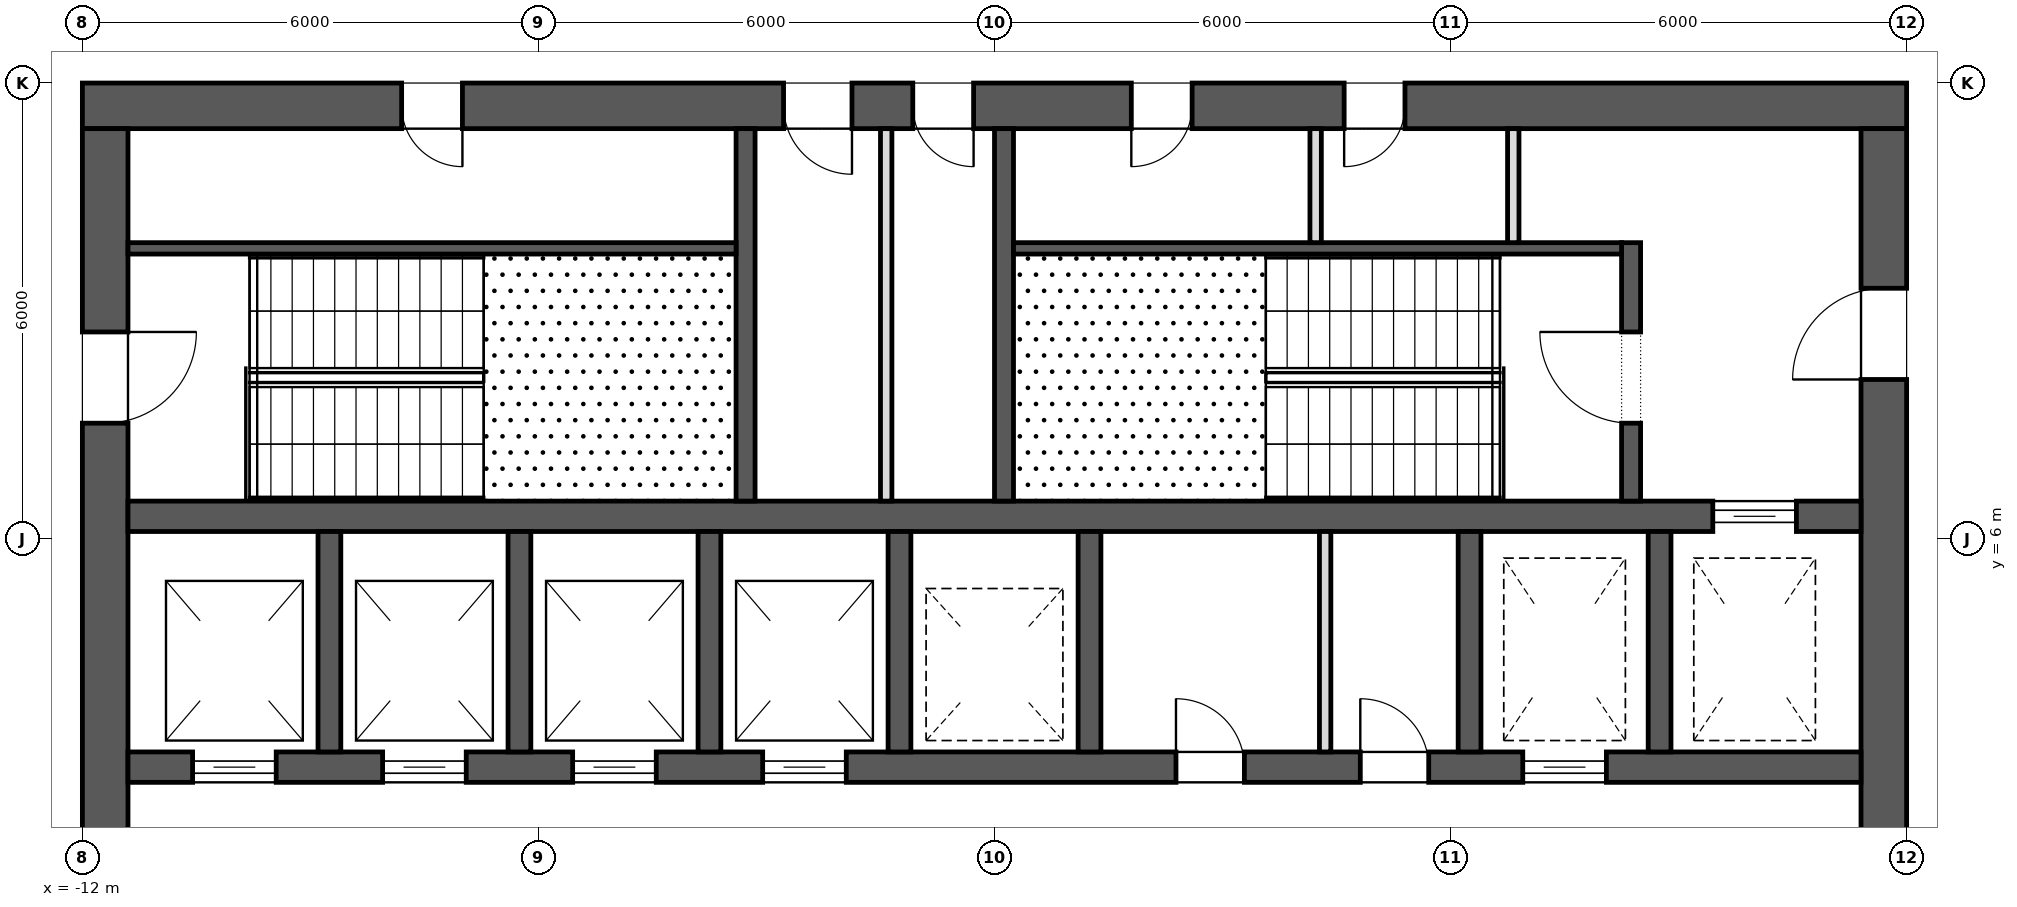
"""IFC4 building model, lengths in metres.
Left out: names, types, materials, properties, quantities, classifications, styles, units other than length and angle.
Written with IfcOpenShell. Run it as: python <this file> out.ifc"""

import sys

from ifc_helpers import new_model, si_unit, direction, frame, frame_2d, origin, place, context, subcontext, project, spatial, rectangle, extrude, element, fill, save


model = new_model("IFC4")
c1 = context("Model", 3, precision=1e-05, world=origin(), true_north=direction((0.0, 1.0)))
c2 = subcontext(c1, "Body", "Model", "MODEL_VIEW")
j1 = project(units=[si_unit("LENGTHUNIT", "METRE"), si_unit("PLANEANGLEUNIT", "RADIAN")], contexts=[c1])
p1 = place(None, origin())
s1 = spatial("IfcSite", under=j1, at=p1, CompositionType="ELEMENT")
p2 = place(p1, origin())
s2 = spatial("IfcBuilding", under=s1, at=p2, CompositionType="ELEMENT")
p3 = place(p2, frame((0.0, 0.0, 178.9)))
s3 = spatial("IfcBuildingStorey", under=s2, at=p3, CompositionType="ELEMENT", Elevation=178.9)
p4 = place(p3, frame((-12.0, 11.7, 0.0), z_axis=(0.0, 0.0, 1.0), x_axis=(1.0, 0.0, 0.0)))
e1 = element("IfcWall", 1, at=p4, inside=s3, PredefinedType="SHEAR", context=c2, shape_type="SweptSolid", body=[
    extrude(rectangle(XDim=24.0, YDim=0.6, at=frame_2d((12.0, 0.0))), origin(), (0.0, 0.0, 1.0), 4.0),
])
p5 = place(p4, frame((9.225, 0.0, 0.0)))
e2 = element("IfcOpeningElement", 2, at=p5, cuts=e1, PredefinedType="OPENING", context=c2, shape_type="SweptSolid", body=[
    extrude(rectangle(XDim=0.9, YDim=2.1, at=frame_2d((0.45, 1.05))), frame((0.0, 0.312, 0.0), z_axis=(0.0, -1.0, 0.0), x_axis=(1.0, 0.0, 0.0)), (0.0, 0.0, 1.0), 0.624),
])
p6 = place(p4, frame((10.925, 0.0, 0.0)))
e3 = element("IfcOpeningElement", 3, at=p6, cuts=e1, PredefinedType="OPENING", context=c2, shape_type="SweptSolid", body=[
    extrude(rectangle(XDim=0.8, YDim=2.1, at=frame_2d((0.4, 1.05))), frame((0.0, 0.312, 0.0), z_axis=(0.0, -1.0, 0.0), x_axis=(1.0, 0.0, 0.0)), (0.0, 0.0, 1.0), 0.624),
])
p7 = place(p4, frame((4.2, 0.0, 0.0)))
e4 = element("IfcOpeningElement", 4, at=p7, cuts=e1, PredefinedType="OPENING", context=c2, shape_type="SweptSolid", body=[
    extrude(rectangle(XDim=0.8, YDim=2.1, at=frame_2d((0.4, 1.05))), frame((0.0, 0.312, 0.0), z_axis=(0.0, -1.0, 0.0), x_axis=(1.0, 0.0, 0.0)), (0.0, 0.0, 1.0), 0.624),
])
p8 = place(p4, frame((13.8, 0.0, 0.0)))
e5 = element("IfcOpeningElement", 5, at=p8, cuts=e1, PredefinedType="OPENING", context=c2, shape_type="SweptSolid", body=[
    extrude(rectangle(XDim=0.8, YDim=2.1, at=frame_2d((0.4, 1.05))), frame((0.0, 0.312, 0.0), z_axis=(0.0, -1.0, 0.0), x_axis=(1.0, 0.0, 0.0)), (0.0, 0.0, 1.0), 0.624),
])
p9 = place(p4, frame((16.6, 0.0, 0.0)))
e6 = element("IfcOpeningElement", 6, at=p9, cuts=e1, PredefinedType="OPENING", context=c2, shape_type="SweptSolid", body=[
    extrude(rectangle(XDim=0.8, YDim=2.1, at=frame_2d((0.4, 1.05))), frame((0.0, 0.312, 0.0), z_axis=(0.0, -1.0, 0.0), x_axis=(1.0, 0.0, 0.0)), (0.0, 0.0, 1.0), 0.624),
])
p10 = place(p3, frame((11.7, -11.4, 0.0), z_axis=(0.0, 0.0, 1.0), x_axis=(0.0, 1.0, 0.0)))
e7 = element("IfcWall", 7, at=p10, inside=s3, PredefinedType="SHEAR", context=c2, shape_type="SweptSolid", body=[
    extrude(rectangle(XDim=22.8, YDim=0.6, at=frame_2d((11.4, 0.0))), origin(), (0.0, 0.0, 1.0), 4.0),
])
p11 = place(p10, frame((10.2, 0.0, 0.0)))
e8 = element("IfcOpeningElement", 8, at=p11, cuts=e7, PredefinedType="OPENING", context=c2, shape_type="SweptSolid", body=[
    extrude(rectangle(XDim=2.4, YDim=2.1, at=frame_2d((1.2, 1.05))), frame((0.0, 0.312, 0.0), z_axis=(0.0, -1.0, 0.0), x_axis=(1.0, 0.0, 0.0)), (0.0, 0.0, 1.0), 0.624),
])
p12 = place(p10, frame((19.5, 0.0, 0.0)))
e9 = element("IfcOpeningElement", 9, at=p12, cuts=e7, PredefinedType="OPENING", context=c2, shape_type="SweptSolid", body=[
    extrude(rectangle(XDim=1.2, YDim=2.1, at=frame_2d((0.6, 1.05))), frame((0.0, 0.312, 0.0), z_axis=(0.0, -1.0, 0.0), x_axis=(1.0, 0.0, 0.0)), (0.0, 0.0, 1.0), 0.624),
])
p13 = place(p10, frame((2.1, 0.0, 0.0)))
e10 = element("IfcOpeningElement", 10, at=p13, cuts=e7, PredefinedType="OPENING", context=c2, shape_type="SweptSolid", body=[
    extrude(rectangle(XDim=1.2, YDim=2.1, at=frame_2d((0.6, 1.05))), frame((0.0, 0.312, 0.0), z_axis=(0.0, -1.0, 0.0), x_axis=(1.0, 0.0, 0.0)), (0.0, 0.0, 1.0), 0.624),
])
p14 = place(p3, frame((-11.7, -11.4, 0.0), z_axis=(0.0, 0.0, 1.0), x_axis=(0.0, 1.0, 0.0)))
e11 = element("IfcWall", 11, at=p14, inside=s3, PredefinedType="SHEAR", context=c2, shape_type="SweptSolid", body=[
    extrude(rectangle(XDim=22.8, YDim=0.6, at=frame_2d((11.4, 0.0))), origin(), (0.0, 0.0, 1.0), 4.0),
])
p15 = place(p14, frame((10.2, 0.0, 0.0)))
e12 = element("IfcOpeningElement", 12, at=p15, cuts=e11, PredefinedType="OPENING", context=c2, shape_type="SweptSolid", body=[
    extrude(rectangle(XDim=2.4, YDim=2.1, at=frame_2d((1.2, 1.05))), frame((0.0, 0.312, 0.0), z_axis=(0.0, -1.0, 0.0), x_axis=(1.0, 0.0, 0.0)), (0.0, 0.0, 1.0), 0.624),
])
p16 = place(p14, frame((18.925, 0.0, 0.0)))
e13 = element("IfcOpeningElement", 13, at=p16, cuts=e11, PredefinedType="OPENING", context=c2, shape_type="SweptSolid", body=[
    extrude(rectangle(XDim=1.2, YDim=2.1, at=frame_2d((0.6, 1.05))), frame((0.0, 0.312, 0.0), z_axis=(0.0, -1.0, 0.0), x_axis=(1.0, 0.0, 0.0)), (0.0, 0.0, 1.0), 0.624),
])
p17 = place(p14, frame((2.675, 0.0, 0.0)))
e14 = element("IfcOpeningElement", 14, at=p17, cuts=e11, PredefinedType="OPENING", context=c2, shape_type="SweptSolid", body=[
    extrude(rectangle(XDim=1.2, YDim=2.1, at=frame_2d((0.6, 1.05))), frame((0.0, 0.312, 0.0), z_axis=(0.0, -1.0, 0.0), x_axis=(1.0, 0.0, 0.0)), (0.0, 0.0, 1.0), 0.624),
])
p18 = place(p3, frame((-11.4, 3.0, 0.0), z_axis=(0.0, 0.0, 1.0), x_axis=(1.0, 0.0, 0.0)))
e15 = element("IfcWall", 15, at=p18, inside=s3, PredefinedType="SHEAR", context=c2, shape_type="SweptSolid", body=[
    extrude(rectangle(XDim=22.8, YDim=0.4, at=frame_2d((11.4, 0.0))), origin(), (0.0, 0.0, 1.0), 4.0),
])
p19 = place(p18, frame((0.85, 0.0, 0.0)))
e16 = element("IfcOpeningElement", 16, at=p19, cuts=e15, PredefinedType="OPENING", context=c2, shape_type="SweptSolid", body=[
    extrude(rectangle(XDim=1.1, YDim=2.1, at=frame_2d((0.55, 1.05))), frame((0.0, 0.212, 0.0), z_axis=(0.0, -1.0, 0.0), x_axis=(1.0, 0.0, 0.0)), (0.0, 0.0, 1.0), 0.424),
])
p20 = place(p18, frame((3.35, 0.0, 0.0)))
e17 = element("IfcOpeningElement", 17, at=p20, cuts=e15, PredefinedType="OPENING", context=c2, shape_type="SweptSolid", body=[
    extrude(rectangle(XDim=1.1, YDim=2.1, at=frame_2d((0.55, 1.05))), frame((0.0, 0.212, 0.0), z_axis=(0.0, -1.0, 0.0), x_axis=(1.0, 0.0, 0.0)), (0.0, 0.0, 1.0), 0.424),
])
p21 = place(p18, frame((5.85, 0.0, 0.0)))
e18 = element("IfcOpeningElement", 18, at=p21, cuts=e15, PredefinedType="OPENING", context=c2, shape_type="SweptSolid", body=[
    extrude(rectangle(XDim=1.1, YDim=2.1, at=frame_2d((0.55, 1.05))), frame((0.0, 0.212, 0.0), z_axis=(0.0, -1.0, 0.0), x_axis=(1.0, 0.0, 0.0)), (0.0, 0.0, 1.0), 0.424),
])
p22 = place(p18, frame((8.35, 0.0, 0.0)))
e19 = element("IfcOpeningElement", 19, at=p22, cuts=e15, PredefinedType="OPENING", context=c2, shape_type="SweptSolid", body=[
    extrude(rectangle(XDim=1.1, YDim=2.1, at=frame_2d((0.55, 1.05))), frame((0.0, 0.212, 0.0), z_axis=(0.0, -1.0, 0.0), x_axis=(1.0, 0.0, 0.0)), (0.0, 0.0, 1.0), 0.424),
])
p23 = place(p18, frame((18.35, 0.0, 0.0)))
e20 = element("IfcOpeningElement", 20, at=p23, cuts=e15, PredefinedType="OPENING", context=c2, shape_type="SweptSolid", body=[
    extrude(rectangle(XDim=1.1, YDim=2.1, at=frame_2d((0.55, 1.05))), frame((0.0, 0.212, 0.0), z_axis=(0.0, -1.0, 0.0), x_axis=(1.0, 0.0, 0.0)), (0.0, 0.0, 1.0), 0.424),
])
p24 = place(p18, frame((13.788, 0.0, 0.0)))
e21 = element("IfcOpeningElement", 21, at=p24, cuts=e15, PredefinedType="OPENING", context=c2, shape_type="SweptSolid", body=[
    extrude(rectangle(XDim=0.9, YDim=2.1, at=frame_2d((0.45, 1.05))), frame((0.0, 0.212, 0.0), z_axis=(0.0, -1.0, 0.0), x_axis=(1.0, 0.0, 0.0)), (0.0, 0.0, 1.0), 0.424),
])
p25 = place(p18, frame((16.212, 0.0, 0.0)))
e22 = element("IfcOpeningElement", 22, at=p25, cuts=e15, PredefinedType="OPENING", context=c2, shape_type="SweptSolid", body=[
    extrude(rectangle(XDim=0.9, YDim=2.1, at=frame_2d((0.45, 1.05))), frame((0.0, 0.212, 0.0), z_axis=(0.0, -1.0, 0.0), x_axis=(1.0, 0.0, 0.0)), (0.0, 0.0, 1.0), 0.424),
])
p26 = place(p3, frame((-11.4, 6.3, 0.0), z_axis=(0.0, 0.0, 1.0), x_axis=(1.0, 0.0, 0.0)))
e23 = element("IfcWall", 23, at=p26, inside=s3, PredefinedType="SHEAR", context=c2, shape_type="SweptSolid", body=[
    extrude(rectangle(XDim=22.8, YDim=0.4, at=frame_2d((11.4, 0.0))), origin(), (0.0, 0.0, 1.0), 4.0),
])
p27 = place(p26, frame((20.85, 0.0, 0.0)))
e24 = element("IfcOpeningElement", 24, at=p27, cuts=e23, PredefinedType="OPENING", context=c2, shape_type="SweptSolid", body=[
    extrude(rectangle(XDim=1.1, YDim=2.1, at=frame_2d((0.55, 1.05))), frame((0.0, 0.212, 0.0), z_axis=(0.0, -1.0, 0.0), x_axis=(1.0, 0.0, 0.0)), (0.0, 0.0, 1.0), 0.424),
])
for number, where, z_axis, x_axis in (
    (25, (-8.75, 3.2, 0.0), (0.0, 0.0, 1.0), (0.0, 1.0, 0.0)),
    (26, (-6.25, 3.2, 0.0), (0.0, 0.0, 1.0), (0.0, 1.0, 0.0)),
    (27, (-3.75, 3.2, 0.0), (0.0, 0.0, 1.0), (0.0, 1.0, 0.0)),
    (28, (-1.25, 3.2, 0.0), (0.0, 0.0, 1.0), (0.0, 1.0, 0.0)),
    (29, (1.25, 3.2, 0.0), (0.0, 0.0, 1.0), (0.0, 1.0, 0.0)),
    (30, (6.25, 3.2, 0.0), (0.0, 0.0, 1.0), (0.0, 1.0, 0.0)),
    (31, (8.75, 3.2, 0.0), (0.0, 0.0, 1.0), (0.0, 1.0, 0.0)),
):
    element("IfcWall", number, at=place(p3, frame(where, z_axis=z_axis, x_axis=x_axis)), inside=s3, PredefinedType="SHEAR", context=c2, shape_type="SweptSolid", body=[
        extrude(rectangle(XDim=2.9, YDim=0.3, at=frame_2d((1.45, 0.0))), origin(), (0.0, 0.0, 1.0), 4.0),
    ])
for number, where, z_axis, x_axis in (
    (32, (-3.275, 6.5, 0.0), (0.0, 0.0, 1.0), (0.0, 1.0, 0.0)),
    (33, (0.125, 6.5, 0.0), (0.0, 0.0, 1.0), (0.0, 1.0, 0.0)),
):
    element("IfcWall", number, at=place(p3, frame(where, z_axis=z_axis, x_axis=x_axis)), inside=s3, PredefinedType="SHEAR", context=c2, shape_type="SweptSolid", body=[
        extrude(rectangle(XDim=4.9, YDim=0.25, at=frame_2d((2.45, 0.0))), origin(), (0.0, 0.0, 1.0), 3.7),
    ])
p28 = place(p3, frame((8.375, 6.5, 0.0), z_axis=(0.0, 0.0, 1.0), x_axis=(0.0, 1.0, 0.0)))
e34 = element("IfcWall", 34, at=p28, inside=s3, PredefinedType="SHEAR", context=c2, shape_type="SweptSolid", body=[
    extrude(rectangle(XDim=3.4, YDim=0.25, at=frame_2d((1.7, 0.0))), origin(), (0.0, 0.0, 1.0), 3.7),
])
p29 = place(p28, frame((1.025, 0.0, 0.0)))
e35 = element("IfcOpeningElement", 35, at=p29, cuts=e34, PredefinedType="OPENING", context=c2, shape_type="SweptSolid", body=[
    extrude(rectangle(XDim=1.2, YDim=2.1, at=frame_2d((0.6, 1.05))), frame((0.0, 0.137, 0.0), z_axis=(0.0, -1.0, 0.0), x_axis=(1.0, 0.0, 0.0)), (0.0, 0.0, 1.0), 0.274),
])
for number, where, z_axis, x_axis in (
    (36, (-11.4, 9.825, 0.0), (0.0, 0.0, 1.0), (1.0, 0.0, 0.0)),
    (37, (0.25, 9.825, 0.0), (0.0, 0.0, 1.0), (1.0, 0.0, 0.0)),
):
    element("IfcWall", number, at=place(p3, frame(where, z_axis=z_axis, x_axis=x_axis)), inside=s3, PredefinedType="SHEAR", context=c2, shape_type="SweptSolid", body=[
        extrude(rectangle(XDim=8.0, YDim=0.15, at=frame_2d((4.0, 0.0))), origin(), (0.0, 0.0, 1.0), 3.7),
    ])
p30 = place(p3, frame((-1.425, 6.5, 0.0), z_axis=(0.0, 0.0, 1.0), x_axis=(0.0, 1.0, 0.0)))
e38 = element("IfcWall", 38, at=p30, inside=s3, PredefinedType="PARTITIONING", context=c2, shape_type="SweptSolid", body=[
    extrude(rectangle(XDim=4.9, YDim=0.15, at=frame_2d((2.45, 0.0))), origin(), (0.0, 0.0, 1.0), 3.7),
])
for number, where, z_axis, x_axis in (
    (39, (4.225, 9.9, 0.0), (0.0, 0.0, 1.0), (0.0, 1.0, 0.0)),
    (40, (6.825, 9.9, 0.0), (0.0, 0.0, 1.0), (0.0, 1.0, 0.0)),
):
    element("IfcWall", number, at=place(p3, frame(where, z_axis=z_axis, x_axis=x_axis)), inside=s3, PredefinedType="PARTITIONING", context=c2, shape_type="SweptSolid", body=[
        extrude(rectangle(XDim=1.5, YDim=0.15, at=frame_2d((0.75, 0.0))), origin(), (0.0, 0.0, 1.0), 3.7),
    ])
p31 = place(p3, frame((4.35, 3.2, 0.0), z_axis=(0.0, 0.0, 1.0), x_axis=(0.0, 1.0, 0.0)))
e41 = element("IfcWall", 41, at=p31, inside=s3, PredefinedType="PARTITIONING", context=c2, shape_type="SweptSolid", body=[
    extrude(rectangle(XDim=2.9, YDim=0.15, at=frame_2d((1.45, 0.0))), origin(), (0.0, 0.0, 1.0), 3.7),
])
p32 = place(p27, origin())
e42 = element("IfcDoor", 42, at=p32, inside=s3, OperationType="SLIDING_TO_LEFT", PredefinedType="DOOR", context=c2, shape_type="SweptSolid", body=[
    extrude(rectangle(XDim=1.1, YDim=2.1, at=frame_2d((0.55, 1.05))), frame((0.0, 0.025, 0.0), z_axis=(0.0, -1.0, 0.0), x_axis=(1.0, 0.0, 0.0)), (0.0, 0.0, 1.0), 0.05),
])
fill(e24, e42)
p33 = place(p19, origin())
e43 = element("IfcDoor", 43, at=p33, inside=s3, OperationType="SLIDING_TO_LEFT", PredefinedType="DOOR", context=c2, shape_type="SweptSolid", body=[
    extrude(rectangle(XDim=1.1, YDim=2.1, at=frame_2d((0.55, 1.05))), frame((0.0, 0.025, 0.0), z_axis=(0.0, -1.0, 0.0), x_axis=(1.0, 0.0, 0.0)), (0.0, 0.0, 1.0), 0.05),
])
fill(e16, e43)
p34 = place(p20, origin())
e44 = element("IfcDoor", 44, at=p34, inside=s3, OperationType="SLIDING_TO_LEFT", PredefinedType="DOOR", context=c2, shape_type="SweptSolid", body=[
    extrude(rectangle(XDim=1.1, YDim=2.1, at=frame_2d((0.55, 1.05))), frame((0.0, 0.025, 0.0), z_axis=(0.0, -1.0, 0.0), x_axis=(1.0, 0.0, 0.0)), (0.0, 0.0, 1.0), 0.05),
])
fill(e17, e44)
p35 = place(p21, origin())
e45 = element("IfcDoor", 45, at=p35, inside=s3, OperationType="SLIDING_TO_LEFT", PredefinedType="DOOR", context=c2, shape_type="SweptSolid", body=[
    extrude(rectangle(XDim=1.1, YDim=2.1, at=frame_2d((0.55, 1.05))), frame((0.0, 0.025, 0.0), z_axis=(0.0, -1.0, 0.0), x_axis=(1.0, 0.0, 0.0)), (0.0, 0.0, 1.0), 0.05),
])
fill(e18, e45)
p36 = place(p22, origin())
e46 = element("IfcDoor", 46, at=p36, inside=s3, OperationType="SLIDING_TO_LEFT", PredefinedType="DOOR", context=c2, shape_type="SweptSolid", body=[
    extrude(rectangle(XDim=1.1, YDim=2.1, at=frame_2d((0.55, 1.05))), frame((0.0, 0.025, 0.0), z_axis=(0.0, -1.0, 0.0), x_axis=(1.0, 0.0, 0.0)), (0.0, 0.0, 1.0), 0.05),
])
fill(e19, e46)
p37 = place(p23, origin())
e47 = element("IfcDoor", 47, at=p37, inside=s3, OperationType="SLIDING_TO_LEFT", PredefinedType="DOOR", context=c2, shape_type="SweptSolid", body=[
    extrude(rectangle(XDim=1.1, YDim=2.1, at=frame_2d((0.55, 1.05))), frame((0.0, 0.025, 0.0), z_axis=(0.0, -1.0, 0.0), x_axis=(1.0, 0.0, 0.0)), (0.0, 0.0, 1.0), 0.05),
])
fill(e20, e47)
p38 = place(p16, frame((1.2, 0.0, 0.0), z_axis=(0.0, 0.0, 1.0), x_axis=(-1.0, 0.0, 0.0)))
e48 = element("IfcDoor", 48, at=p38, inside=s3, OperationType="SINGLE_SWING_RIGHT", PredefinedType="DOOR", context=c2, shape_type="SweptSolid", body=[
    extrude(rectangle(XDim=1.2, YDim=2.1, at=frame_2d((0.6, 1.05))), frame((0.0, 0.025, 0.0), z_axis=(0.0, -1.0, 0.0), x_axis=(1.0, 0.0, 0.0)), (0.0, 0.0, 1.0), 0.05),
])
fill(e13, e48)
p39 = place(p29, origin())
e49 = element("IfcDoor", 49, at=p39, inside=s3, OperationType="SINGLE_SWING_LEFT", PredefinedType="DOOR", context=c2, shape_type="SweptSolid", body=[
    extrude(rectangle(XDim=1.2, YDim=2.1, at=frame_2d((0.6, 1.05))), frame((0.0, 0.025, 0.0), z_axis=(0.0, -1.0, 0.0), x_axis=(1.0, 0.0, 0.0)), (0.0, 0.0, 1.0), 0.05),
])
fill(e35, e49)
p40 = place(p12, origin())
e50 = element("IfcDoor", 50, at=p40, inside=s3, OperationType="SINGLE_SWING_RIGHT", PredefinedType="DOOR", context=c2, shape_type="SweptSolid", body=[
    extrude(rectangle(XDim=1.2, YDim=2.1, at=frame_2d((0.6, 1.05))), frame((0.0, 0.025, 0.0), z_axis=(0.0, -1.0, 0.0), x_axis=(1.0, 0.0, 0.0)), (0.0, 0.0, 1.0), 0.05),
])
fill(e9, e50)
p41 = place(p5, frame((0.9, 0.0, 0.0), z_axis=(0.0, 0.0, 1.0), x_axis=(-1.0, 0.0, 0.0)))
e51 = element("IfcDoor", 51, at=p41, inside=s3, OperationType="SINGLE_SWING_RIGHT", PredefinedType="DOOR", context=c2, shape_type="SweptSolid", body=[
    extrude(rectangle(XDim=0.9, YDim=2.1, at=frame_2d((0.45, 1.05))), frame((0.0, 0.025, 0.0), z_axis=(0.0, -1.0, 0.0), x_axis=(1.0, 0.0, 0.0)), (0.0, 0.0, 1.0), 0.05),
])
fill(e2, e51)
p42 = place(p6, frame((0.8, 0.0, 0.0), z_axis=(0.0, 0.0, 1.0), x_axis=(-1.0, 0.0, 0.0)))
e52 = element("IfcDoor", 52, at=p42, inside=s3, OperationType="SINGLE_SWING_RIGHT", PredefinedType="DOOR", context=c2, shape_type="SweptSolid", body=[
    extrude(rectangle(XDim=0.8, YDim=2.1, at=frame_2d((0.4, 1.05))), frame((0.0, 0.025, 0.0), z_axis=(0.0, -1.0, 0.0), x_axis=(1.0, 0.0, 0.0)), (0.0, 0.0, 1.0), 0.05),
])
fill(e3, e52)
p43 = place(p7, frame((0.8, 0.0, 0.0), z_axis=(0.0, 0.0, 1.0), x_axis=(-1.0, 0.0, 0.0)))
e53 = element("IfcDoor", 53, at=p43, inside=s3, OperationType="SINGLE_SWING_RIGHT", PredefinedType="DOOR", context=c2, shape_type="SweptSolid", body=[
    extrude(rectangle(XDim=0.8, YDim=2.1, at=frame_2d((0.4, 1.05))), frame((0.0, 0.025, 0.0), z_axis=(0.0, -1.0, 0.0), x_axis=(1.0, 0.0, 0.0)), (0.0, 0.0, 1.0), 0.05),
])
fill(e4, e53)
p44 = place(p8, frame((0.8, 0.0, 0.0), z_axis=(0.0, 0.0, 1.0), x_axis=(-1.0, 0.0, 0.0)))
e54 = element("IfcDoor", 54, at=p44, inside=s3, OperationType="SINGLE_SWING_LEFT", PredefinedType="DOOR", context=c2, shape_type="SweptSolid", body=[
    extrude(rectangle(XDim=0.8, YDim=2.1, at=frame_2d((0.4, 1.05))), frame((0.0, 0.025, 0.0), z_axis=(0.0, -1.0, 0.0), x_axis=(1.0, 0.0, 0.0)), (0.0, 0.0, 1.0), 0.05),
])
fill(e5, e54)
p45 = place(p9, frame((0.8, 0.0, 0.0), z_axis=(0.0, 0.0, 1.0), x_axis=(-1.0, 0.0, 0.0)))
e55 = element("IfcDoor", 55, at=p45, inside=s3, OperationType="SINGLE_SWING_LEFT", PredefinedType="DOOR", context=c2, shape_type="SweptSolid", body=[
    extrude(rectangle(XDim=0.8, YDim=2.1, at=frame_2d((0.4, 1.05))), frame((0.0, 0.025, 0.0), z_axis=(0.0, -1.0, 0.0), x_axis=(1.0, 0.0, 0.0)), (0.0, 0.0, 1.0), 0.05),
])
fill(e6, e55)
p46 = place(p24, origin())
e56 = element("IfcDoor", 56, at=p46, inside=s3, OperationType="SINGLE_SWING_RIGHT", PredefinedType="DOOR", context=c2, shape_type="SweptSolid", body=[
    extrude(rectangle(XDim=0.9, YDim=2.1, at=frame_2d((0.45, 1.05))), frame((0.0, 0.025, 0.0), z_axis=(0.0, -1.0, 0.0), x_axis=(1.0, 0.0, 0.0)), (0.0, 0.0, 1.0), 0.05),
])
fill(e21, e56)
p47 = place(p25, origin())
e57 = element("IfcDoor", 57, at=p47, inside=s3, OperationType="SINGLE_SWING_RIGHT", PredefinedType="DOOR", context=c2, shape_type="SweptSolid", body=[
    extrude(rectangle(XDim=0.9, YDim=2.1, at=frame_2d((0.45, 1.05))), frame((0.0, 0.025, 0.0), z_axis=(0.0, -1.0, 0.0), x_axis=(1.0, 0.0, 0.0)), (0.0, 0.0, 1.0), 0.05),
])
fill(e22, e57)
save(model, sys.argv[1])
